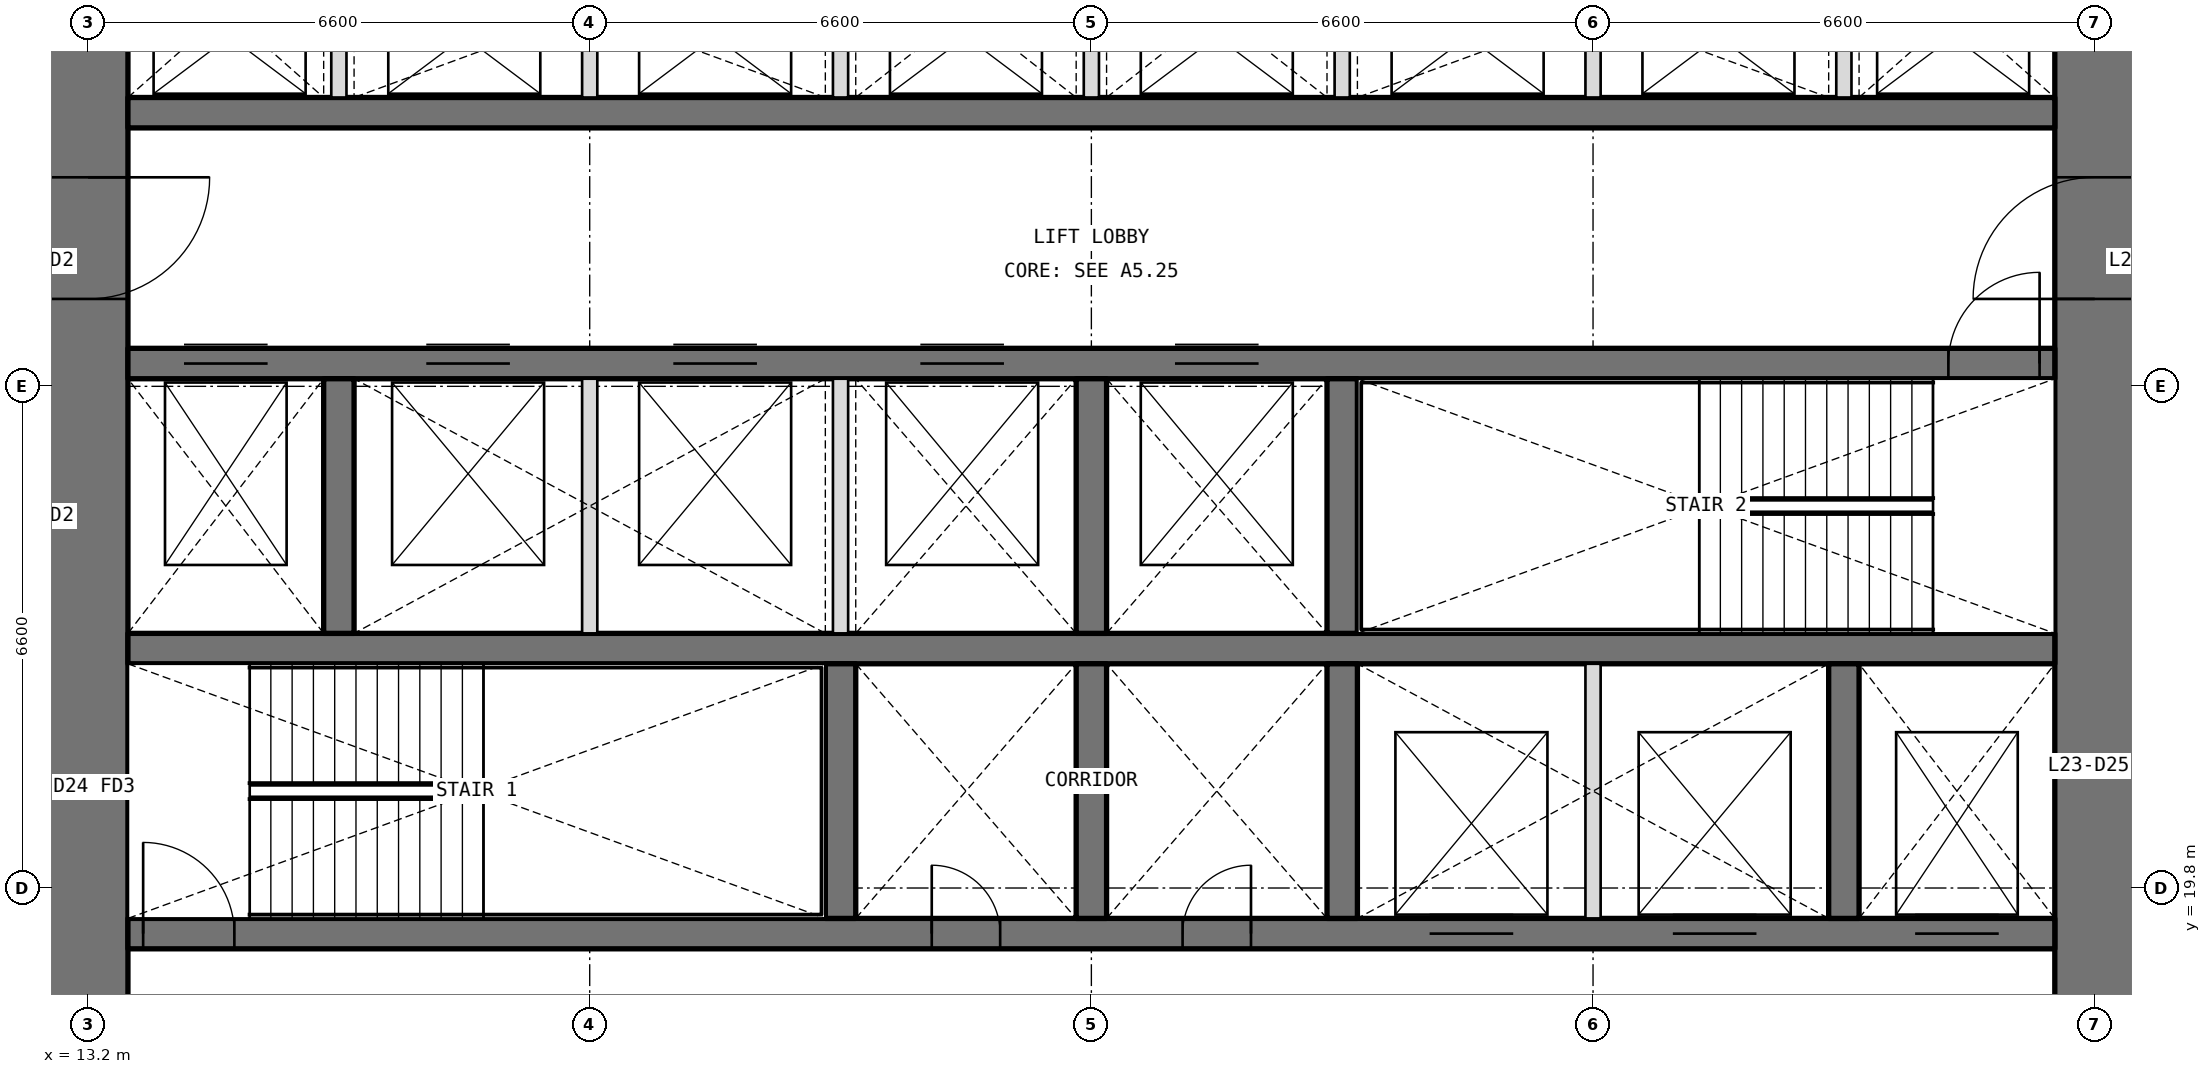
"""IFC4 building model, lengths in metres.
Left out: names, types, materials, properties, quantities, classifications, styles, units other than length and angle.
Written with IfcOpenShell. Run it as: python <this file> out.ifc"""

import sys

from ifc_helpers import new_model, si_unit, direction, frame, frame_2d, origin, place, context, subcontext, project, spatial, rectangle, extrude, element, fill, save


model = new_model("IFC4")
c1 = context("Model", 3, precision=1e-05, world=origin(), true_north=direction((0.0, 1.0)))
c2 = subcontext(c1, "Body", "Model", "MODEL_VIEW")
j1 = project(units=[si_unit("LENGTHUNIT", "METRE"), si_unit("PLANEANGLEUNIT", "RADIAN")], contexts=[c1])
p1 = place(None, origin())
s1 = spatial("IfcSite", under=j1, at=p1, CompositionType="ELEMENT")
p2 = place(p1, origin())
s2 = spatial("IfcBuilding", under=s1, at=p2, CompositionType="ELEMENT")
p3 = place(p2, frame((0.0, 0.0, 103.2)))
s3 = spatial("IfcBuildingStorey", under=s2, at=p3, CompositionType="ELEMENT", Elevation=103.2)
p4 = place(p3, frame((39.6, 13.725, 0.0), z_axis=(0.0, 0.0, 1.0), x_axis=(0.0, 1.0, 0.0)))
e1 = element("IfcWall", 1, at=p4, inside=s3, PredefinedType="SHEAR", context=c2, shape_type="SweptSolid", body=[
    extrude(rectangle(XDim=18.75, YDim=1.05, at=frame_2d((9.375, 0.0))), origin(), (0.0, 0.0, 1.0), 4.2),
])
p5 = place(p4, frame((3.025, 0.0, 0.0)))
e2 = element("IfcOpeningElement", 2, at=p5, cuts=e1, PredefinedType="OPENING", context=c2, shape_type="SweptSolid", body=[
    extrude(rectangle(XDim=1.6, YDim=2.1, at=frame_2d((0.8, 1.05))), frame((0.0, 0.535, 0.0), z_axis=(0.0, -1.0, 0.0), x_axis=(1.0, 0.0, 0.0)), (0.0, 0.0, 1.0), 1.07),
])
p6 = place(p4, frame((13.825, 0.0, 0.0)))
e3 = element("IfcOpeningElement", 3, at=p6, cuts=e1, PredefinedType="OPENING", context=c2, shape_type="SweptSolid", body=[
    extrude(rectangle(XDim=1.6, YDim=2.1, at=frame_2d((0.8, 1.05))), frame((0.0, 0.535, 0.0), z_axis=(0.0, -1.0, 0.0), x_axis=(1.0, 0.0, 0.0)), (0.0, 0.0, 1.0), 1.07),
])
p7 = place(p3, frame((13.2, 32.475, 0.0), z_axis=(0.0, 0.0, 1.0), x_axis=(0.0, -1.0, 0.0)))
e4 = element("IfcWall", 4, at=p7, inside=s3, PredefinedType="SHEAR", context=c2, shape_type="SweptSolid", body=[
    extrude(rectangle(XDim=18.75, YDim=1.05, at=frame_2d((9.375, 0.0))), origin(), (0.0, 0.0, 1.0), 4.2),
])
p8 = place(p7, frame((14.125, 0.0, 0.0)))
e5 = element("IfcOpeningElement", 5, at=p8, cuts=e4, PredefinedType="OPENING", context=c2, shape_type="SweptSolid", body=[
    extrude(rectangle(XDim=1.6, YDim=2.1, at=frame_2d((0.8, 1.05))), frame((0.0, 0.535, 0.0), z_axis=(0.0, -1.0, 0.0), x_axis=(1.0, 0.0, 0.0)), (0.0, 0.0, 1.0), 1.07),
])
p9 = place(p7, frame((3.325, 0.0, 0.0)))
e6 = element("IfcOpeningElement", 6, at=p9, cuts=e4, PredefinedType="OPENING", context=c2, shape_type="SweptSolid", body=[
    extrude(rectangle(XDim=1.6, YDim=2.1, at=frame_2d((0.8, 1.05))), frame((0.0, 0.535, 0.0), z_axis=(0.0, -1.0, 0.0), x_axis=(1.0, 0.0, 0.0)), (0.0, 0.0, 1.0), 1.07),
])
p10 = place(p3, frame((13.725, 19.2, 0.0), z_axis=(0.0, 0.0, 1.0), x_axis=(1.0, 0.0, 0.0)))
e7 = element("IfcWall", 7, at=p10, inside=s3, PredefinedType="SHEAR", context=c2, shape_type="SweptSolid", body=[
    extrude(rectangle(XDim=25.35, YDim=0.4, at=frame_2d((12.675, 0.0))), origin(), (0.0, 0.0, 1.0), 4.2),
])
p11 = place(p10, frame((10.575, 0.0, 0.0)))
e8 = element("IfcOpeningElement", 8, at=p11, cuts=e7, PredefinedType="OPENING", context=c2, shape_type="SweptSolid", body=[
    extrude(rectangle(XDim=0.9, YDim=2.1, at=frame_2d((0.45, 1.05))), frame((0.0, 0.21, 0.0), z_axis=(0.0, -1.0, 0.0), x_axis=(1.0, 0.0, 0.0)), (0.0, 0.0, 1.0), 0.42),
])
p12 = place(p10, frame((13.875, 0.0, 0.0)))
e9 = element("IfcOpeningElement", 9, at=p12, cuts=e7, PredefinedType="OPENING", context=c2, shape_type="SweptSolid", body=[
    extrude(rectangle(XDim=0.9, YDim=2.1, at=frame_2d((0.45, 1.05))), frame((0.0, 0.21, 0.0), z_axis=(0.0, -1.0, 0.0), x_axis=(1.0, 0.0, 0.0)), (0.0, 0.0, 1.0), 0.42),
])
p13 = place(p10, frame((0.2, 0.0, 0.0)))
e10 = element("IfcOpeningElement", 10, at=p13, cuts=e7, PredefinedType="OPENING", context=c2, shape_type="SweptSolid", body=[
    extrude(rectangle(XDim=1.2, YDim=2.1, at=frame_2d((0.6, 1.05))), frame((0.0, 0.21, 0.0), z_axis=(0.0, -1.0, 0.0), x_axis=(1.0, 0.0, 0.0)), (0.0, 0.0, 1.0), 0.42),
])
p14 = place(p10, frame((23.512, 0.0, 0.0)))
e11 = element("IfcOpeningElement", 11, at=p14, cuts=e7, PredefinedType="OPENING", context=c2, shape_type="SweptSolid", body=[
    extrude(rectangle(XDim=1.1, YDim=2.1, at=frame_2d((0.55, 1.05))), frame((0.0, 0.21, 0.0), z_axis=(0.0, -1.0, 0.0), x_axis=(1.0, 0.0, 0.0)), (0.0, 0.0, 1.0), 0.42),
])
p15 = place(p10, frame((17.125, 0.0, 0.0)))
e12 = element("IfcOpeningElement", 12, at=p15, cuts=e7, PredefinedType="OPENING", context=c2, shape_type="SweptSolid", body=[
    extrude(rectangle(XDim=1.1, YDim=2.1, at=frame_2d((0.55, 1.05))), frame((0.0, 0.21, 0.0), z_axis=(0.0, -1.0, 0.0), x_axis=(1.0, 0.0, 0.0)), (0.0, 0.0, 1.0), 0.42),
])
p16 = place(p10, frame((20.325, 0.0, 0.0)))
e13 = element("IfcOpeningElement", 13, at=p16, cuts=e7, PredefinedType="OPENING", context=c2, shape_type="SweptSolid", body=[
    extrude(rectangle(XDim=1.1, YDim=2.1, at=frame_2d((0.55, 1.05))), frame((0.0, 0.21, 0.0), z_axis=(0.0, -1.0, 0.0), x_axis=(1.0, 0.0, 0.0)), (0.0, 0.0, 1.0), 0.42),
])
p17 = place(p3, frame((13.725, 22.95, 0.0), z_axis=(0.0, 0.0, 1.0), x_axis=(1.0, 0.0, 0.0)))
e14 = element("IfcWall", 14, at=p17, inside=s3, PredefinedType="SHEAR", context=c2, shape_type="SweptSolid", body=[
    extrude(rectangle(XDim=25.35, YDim=0.4, at=frame_2d((12.675, 0.0))), origin(), (0.0, 0.0, 1.0), 4.2),
])
p18 = place(p3, frame((13.725, 26.7, 0.0), z_axis=(0.0, 0.0, 1.0), x_axis=(1.0, 0.0, 0.0)))
e15 = element("IfcWall", 15, at=p18, inside=s3, PredefinedType="SHEAR", context=c2, shape_type="SweptSolid", body=[
    extrude(rectangle(XDim=25.35, YDim=0.4, at=frame_2d((12.675, 0.0))), origin(), (0.0, 0.0, 1.0), 4.2),
])
p19 = place(p18, frame((23.95, 0.0, 0.0)))
e16 = element("IfcOpeningElement", 16, at=p19, cuts=e15, PredefinedType="OPENING", context=c2, shape_type="SweptSolid", body=[
    extrude(rectangle(XDim=1.2, YDim=2.1, at=frame_2d((0.6, 1.05))), frame((0.0, 0.21, 0.0), z_axis=(0.0, -1.0, 0.0), x_axis=(1.0, 0.0, 0.0)), (0.0, 0.0, 1.0), 0.42),
])
p20 = place(p18, frame((0.738, 0.0, 0.0)))
e17 = element("IfcOpeningElement", 17, at=p20, cuts=e15, PredefinedType="OPENING", context=c2, shape_type="SweptSolid", body=[
    extrude(rectangle(XDim=1.1, YDim=2.1, at=frame_2d((0.55, 1.05))), frame((0.0, 0.21, 0.0), z_axis=(0.0, -1.0, 0.0), x_axis=(1.0, 0.0, 0.0)), (0.0, 0.0, 1.0), 0.42),
])
p21 = place(p18, frame((3.925, 0.0, 0.0)))
e18 = element("IfcOpeningElement", 18, at=p21, cuts=e15, PredefinedType="OPENING", context=c2, shape_type="SweptSolid", body=[
    extrude(rectangle(XDim=1.1, YDim=2.1, at=frame_2d((0.55, 1.05))), frame((0.0, 0.21, 0.0), z_axis=(0.0, -1.0, 0.0), x_axis=(1.0, 0.0, 0.0)), (0.0, 0.0, 1.0), 0.42),
])
p22 = place(p18, frame((7.175, 0.0, 0.0)))
e19 = element("IfcOpeningElement", 19, at=p22, cuts=e15, PredefinedType="OPENING", context=c2, shape_type="SweptSolid", body=[
    extrude(rectangle(XDim=1.1, YDim=2.1, at=frame_2d((0.55, 1.05))), frame((0.0, 0.21, 0.0), z_axis=(0.0, -1.0, 0.0), x_axis=(1.0, 0.0, 0.0)), (0.0, 0.0, 1.0), 0.42),
])
p23 = place(p18, frame((10.425, 0.0, 0.0)))
e20 = element("IfcOpeningElement", 20, at=p23, cuts=e15, PredefinedType="OPENING", context=c2, shape_type="SweptSolid", body=[
    extrude(rectangle(XDim=1.1, YDim=2.1, at=frame_2d((0.55, 1.05))), frame((0.0, 0.21, 0.0), z_axis=(0.0, -1.0, 0.0), x_axis=(1.0, 0.0, 0.0)), (0.0, 0.0, 1.0), 0.42),
])
p24 = place(p18, frame((13.775, 0.0, 0.0)))
e21 = element("IfcOpeningElement", 21, at=p24, cuts=e15, PredefinedType="OPENING", context=c2, shape_type="SweptSolid", body=[
    extrude(rectangle(XDim=1.1, YDim=2.1, at=frame_2d((0.55, 1.05))), frame((0.0, 0.21, 0.0), z_axis=(0.0, -1.0, 0.0), x_axis=(1.0, 0.0, 0.0)), (0.0, 0.0, 1.0), 0.42),
])
p25 = place(p3, frame((13.725, 30.0, 0.0), z_axis=(0.0, 0.0, 1.0), x_axis=(1.0, 0.0, 0.0)))
e22 = element("IfcWall", 22, at=p25, inside=s3, PredefinedType="SHEAR", context=c2, shape_type="SweptSolid", body=[
    extrude(rectangle(XDim=25.35, YDim=0.4, at=frame_2d((12.675, 0.0))), origin(), (0.0, 0.0, 1.0), 4.2),
])
for number, where, z_axis, x_axis in (
    (23, (23.1, 19.4, 0.0), (0.0, 0.0, 1.0), (0.0, 1.0, 0.0)),
    (24, (26.4, 19.4, 0.0), (0.0, 0.0, 1.0), (0.0, 1.0, 0.0)),
    (25, (29.7, 19.4, 0.0), (0.0, 0.0, 1.0), (0.0, 1.0, 0.0)),
    (26, (36.3, 19.4, 0.0), (0.0, 0.0, 1.0), (0.0, 1.0, 0.0)),
    (27, (16.5, 23.15, 0.0), (0.0, 0.0, 1.0), (0.0, 1.0, 0.0)),
    (28, (26.4, 23.15, 0.0), (0.0, 0.0, 1.0), (0.0, 1.0, 0.0)),
    (29, (29.7, 23.15, 0.0), (0.0, 0.0, 1.0), (0.0, 1.0, 0.0)),
):
    element("IfcWall", number, at=place(p3, frame(where, z_axis=z_axis, x_axis=x_axis)), inside=s3, PredefinedType="SHEAR", context=c2, shape_type="SweptSolid", body=[
        extrude(rectangle(XDim=3.35, YDim=0.4, at=frame_2d((1.675, 0.0))), origin(), (0.0, 0.0, 1.0), 4.2),
    ])
for number, where, z_axis, x_axis in (
    (30, (16.5, 30.2, 0.0), (0.0, 0.0, 1.0), (0.0, 1.0, 0.0)),
    (31, (19.8, 30.2, 0.0), (0.0, 0.0, 1.0), (0.0, 1.0, 0.0)),
    (32, (23.1, 30.2, 0.0), (0.0, 0.0, 1.0), (0.0, 1.0, 0.0)),
    (33, (26.4, 30.2, 0.0), (0.0, 0.0, 1.0), (0.0, 1.0, 0.0)),
    (34, (29.7, 30.2, 0.0), (0.0, 0.0, 1.0), (0.0, 1.0, 0.0)),
    (35, (33.0, 30.2, 0.0), (0.0, 0.0, 1.0), (0.0, 1.0, 0.0)),
    (36, (36.3, 30.2, 0.0), (0.0, 0.0, 1.0), (0.0, 1.0, 0.0)),
):
    element("IfcWall", number, at=place(p3, frame(where, z_axis=z_axis, x_axis=x_axis)), inside=s3, PredefinedType="PARTITIONING", context=c2, shape_type="SweptSolid", body=[
        extrude(rectangle(XDim=2.275, YDim=0.2, at=frame_2d((1.138, 0.0))), origin(), (0.0, 0.0, 1.0), 4.2),
    ])
for number, where, z_axis, x_axis in (
    (37, (33.0, 19.4, 0.0), (0.0, 0.0, 1.0), (0.0, 1.0, 0.0)),
    (38, (19.8, 23.15, 0.0), (0.0, 0.0, 1.0), (0.0, 1.0, 0.0)),
    (39, (23.1, 23.15, 0.0), (0.0, 0.0, 1.0), (0.0, 1.0, 0.0)),
):
    element("IfcWall", number, at=place(p3, frame(where, z_axis=z_axis, x_axis=x_axis)), inside=s3, PredefinedType="PARTITIONING", context=c2, shape_type="SweptSolid", body=[
        extrude(rectangle(XDim=3.35, YDim=0.2, at=frame_2d((1.675, 0.0))), origin(), (0.0, 0.0, 1.0), 4.2),
    ])
p26 = place(p11, origin())
e40 = element("IfcDoor", 40, at=p26, inside=s3, OperationType="SINGLE_SWING_LEFT", PredefinedType="DOOR", context=c2, shape_type="SweptSolid", body=[
    extrude(rectangle(XDim=0.9, YDim=2.1, at=frame_2d((0.45, 1.05))), frame((0.0, 0.025, 0.0), z_axis=(0.0, -1.0, 0.0), x_axis=(1.0, 0.0, 0.0)), (0.0, 0.0, 1.0), 0.05),
])
fill(e8, e40)
p27 = place(p12, origin())
e41 = element("IfcDoor", 41, at=p27, inside=s3, OperationType="SINGLE_SWING_RIGHT", PredefinedType="DOOR", context=c2, shape_type="SweptSolid", body=[
    extrude(rectangle(XDim=0.9, YDim=2.1, at=frame_2d((0.45, 1.05))), frame((0.0, 0.025, 0.0), z_axis=(0.0, -1.0, 0.0), x_axis=(1.0, 0.0, 0.0)), (0.0, 0.0, 1.0), 0.05),
])
fill(e9, e41)
p28 = place(p13, origin())
e42 = element("IfcDoor", 42, at=p28, inside=s3, OperationType="SINGLE_SWING_LEFT", PredefinedType="DOOR", context=c2, shape_type="SweptSolid", body=[
    extrude(rectangle(XDim=1.2, YDim=2.1, at=frame_2d((0.6, 1.05))), frame((0.0, 0.025, 0.0), z_axis=(0.0, -1.0, 0.0), x_axis=(1.0, 0.0, 0.0)), (0.0, 0.0, 1.0), 0.05),
])
fill(e10, e42)
p29 = place(p19, origin())
e43 = element("IfcDoor", 43, at=p29, inside=s3, OperationType="SINGLE_SWING_RIGHT", PredefinedType="DOOR", context=c2, shape_type="SweptSolid", body=[
    extrude(rectangle(XDim=1.2, YDim=2.1, at=frame_2d((0.6, 1.05))), frame((0.0, 0.025, 0.0), z_axis=(0.0, -1.0, 0.0), x_axis=(1.0, 0.0, 0.0)), (0.0, 0.0, 1.0), 0.05),
])
fill(e16, e43)
p30 = place(p9, origin())
e44 = element("IfcDoor", 44, at=p30, inside=s3, OperationType="DOUBLE_DOOR_DOUBLE_SWING", PredefinedType="DOOR", context=c2, shape_type="SweptSolid", body=[
    extrude(rectangle(XDim=1.6, YDim=2.1, at=frame_2d((0.8, 1.05))), frame((0.0, 0.025, 0.0), z_axis=(0.0, -1.0, 0.0), x_axis=(1.0, 0.0, 0.0)), (0.0, 0.0, 1.0), 0.05),
])
fill(e6, e44)
p31 = place(p6, origin())
e45 = element("IfcDoor", 45, at=p31, inside=s3, OperationType="DOUBLE_DOOR_DOUBLE_SWING", PredefinedType="DOOR", context=c2, shape_type="SweptSolid", body=[
    extrude(rectangle(XDim=1.6, YDim=2.1, at=frame_2d((0.8, 1.05))), frame((0.0, 0.025, 0.0), z_axis=(0.0, -1.0, 0.0), x_axis=(1.0, 0.0, 0.0)), (0.0, 0.0, 1.0), 0.05),
])
fill(e3, e45)
p32 = place(p20, origin())
e46 = element("IfcDoor", 46, at=p32, inside=s3, OperationType="DOUBLE_DOOR_SLIDING", PredefinedType="DOOR", context=c2, shape_type="SweptSolid", body=[
    extrude(rectangle(XDim=1.1, YDim=2.1, at=frame_2d((0.55, 1.05))), frame((0.0, 0.025, 0.0), z_axis=(0.0, -1.0, 0.0), x_axis=(1.0, 0.0, 0.0)), (0.0, 0.0, 1.0), 0.05),
])
fill(e17, e46)
p33 = place(p14, origin())
e47 = element("IfcDoor", 47, at=p33, inside=s3, OperationType="DOUBLE_DOOR_SLIDING", PredefinedType="DOOR", context=c2, shape_type="SweptSolid", body=[
    extrude(rectangle(XDim=1.1, YDim=2.1, at=frame_2d((0.55, 1.05))), frame((0.0, 0.025, 0.0), z_axis=(0.0, -1.0, 0.0), x_axis=(1.0, 0.0, 0.0)), (0.0, 0.0, 1.0), 0.05),
])
fill(e11, e47)
p34 = place(p15, origin())
e48 = element("IfcDoor", 48, at=p34, inside=s3, OperationType="DOUBLE_DOOR_SLIDING", PredefinedType="DOOR", context=c2, shape_type="SweptSolid", body=[
    extrude(rectangle(XDim=1.1, YDim=2.1, at=frame_2d((0.55, 1.05))), frame((0.0, 0.025, 0.0), z_axis=(0.0, -1.0, 0.0), x_axis=(1.0, 0.0, 0.0)), (0.0, 0.0, 1.0), 0.05),
])
fill(e12, e48)
p35 = place(p16, origin())
e49 = element("IfcDoor", 49, at=p35, inside=s3, OperationType="DOUBLE_DOOR_SLIDING", PredefinedType="DOOR", context=c2, shape_type="SweptSolid", body=[
    extrude(rectangle(XDim=1.1, YDim=2.1, at=frame_2d((0.55, 1.05))), frame((0.0, 0.025, 0.0), z_axis=(0.0, -1.0, 0.0), x_axis=(1.0, 0.0, 0.0)), (0.0, 0.0, 1.0), 0.05),
])
fill(e13, e49)
p36 = place(p21, origin())
e50 = element("IfcDoor", 50, at=p36, inside=s3, OperationType="DOUBLE_DOOR_SLIDING", PredefinedType="DOOR", context=c2, shape_type="SweptSolid", body=[
    extrude(rectangle(XDim=1.1, YDim=2.1, at=frame_2d((0.55, 1.05))), frame((0.0, 0.025, 0.0), z_axis=(0.0, -1.0, 0.0), x_axis=(1.0, 0.0, 0.0)), (0.0, 0.0, 1.0), 0.05),
])
fill(e18, e50)
p37 = place(p22, origin())
e51 = element("IfcDoor", 51, at=p37, inside=s3, OperationType="DOUBLE_DOOR_SLIDING", PredefinedType="DOOR", context=c2, shape_type="SweptSolid", body=[
    extrude(rectangle(XDim=1.1, YDim=2.1, at=frame_2d((0.55, 1.05))), frame((0.0, 0.025, 0.0), z_axis=(0.0, -1.0, 0.0), x_axis=(1.0, 0.0, 0.0)), (0.0, 0.0, 1.0), 0.05),
])
fill(e19, e51)
p38 = place(p23, origin())
e52 = element("IfcDoor", 52, at=p38, inside=s3, OperationType="DOUBLE_DOOR_SLIDING", PredefinedType="DOOR", context=c2, shape_type="SweptSolid", body=[
    extrude(rectangle(XDim=1.1, YDim=2.1, at=frame_2d((0.55, 1.05))), frame((0.0, 0.025, 0.0), z_axis=(0.0, -1.0, 0.0), x_axis=(1.0, 0.0, 0.0)), (0.0, 0.0, 1.0), 0.05),
])
fill(e20, e52)
p39 = place(p24, origin())
e53 = element("IfcDoor", 53, at=p39, inside=s3, OperationType="DOUBLE_DOOR_SLIDING", PredefinedType="DOOR", context=c2, shape_type="SweptSolid", body=[
    extrude(rectangle(XDim=1.1, YDim=2.1, at=frame_2d((0.55, 1.05))), frame((0.0, 0.025, 0.0), z_axis=(0.0, -1.0, 0.0), x_axis=(1.0, 0.0, 0.0)), (0.0, 0.0, 1.0), 0.05),
])
fill(e21, e53)
save(model, sys.argv[1])
